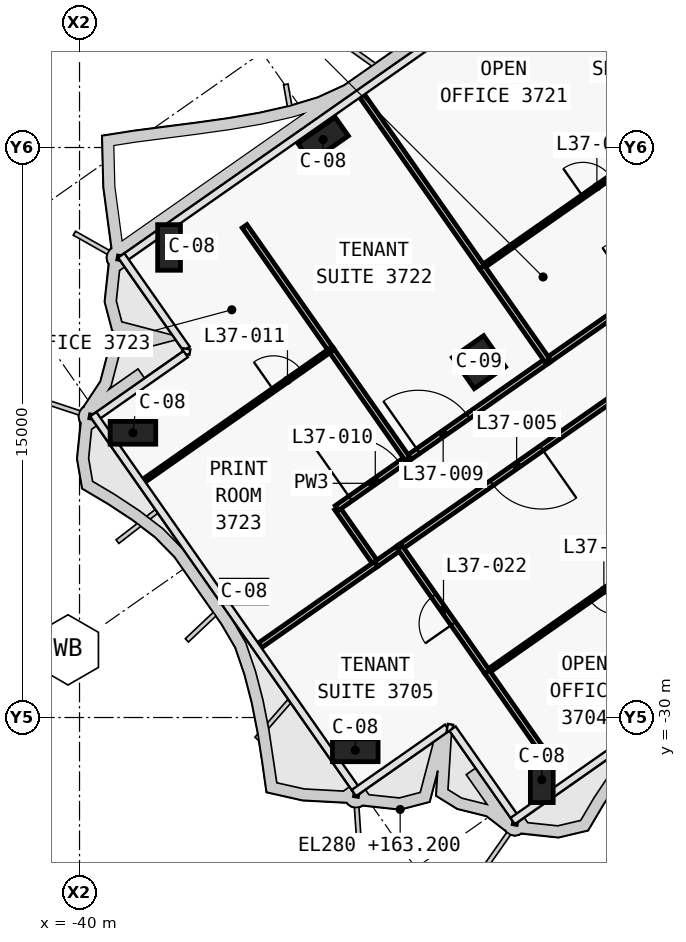
"""IFC4 building model, lengths in metres.
Left out: names, types, materials, properties, quantities, classifications, styles, units other than length and angle.
Written with IfcOpenShell. Run it as: python <this file> out.ifc"""

import sys

from ifc_helpers import new_model, si_unit, direction, frame, frame_2d, origin, origin_2d, place, context, subcontext, project, spatial, polyline, rectangle, outline, extrude, clip, halfspace, element, fill, save


model = new_model("IFC4")
c1 = context("Model", 3, precision=1e-05, world=origin(), true_north=direction((0.0, 1.0)))
c2 = subcontext(c1, "Body", "Model", "MODEL_VIEW")
j1 = project(units=[si_unit("LENGTHUNIT", "METRE"), si_unit("PLANEANGLEUNIT", "RADIAN")], contexts=[c1])
p1 = place(None, origin())
s1 = spatial("IfcSite", under=j1, at=p1, CompositionType="ELEMENT")
p2 = place(p1, origin())
s2 = spatial("IfcBuilding", under=s1, at=p2, CompositionType="ELEMENT")
p3 = place(p2, frame((0.0, 0.0, 163.2)))
s3 = spatial("IfcBuildingStorey", under=s2, at=p3, CompositionType="ELEMENT", Elevation=163.2)
p4 = place(p3, frame((-21.675, -15.421, 0.0), z_axis=(0.0, 0.0, 1.0), x_axis=(-0.573581815061, 0.819148278049, 0.0)))
e1 = element("IfcWall", 1, at=p4, inside=s3, PredefinedType="SHEAR", context=c2, shape_type="SweptSolid", body=[
    extrude(outline(polyline([(0.0, 0.4), (0.0, -0.4), (9.6, -0.4), (9.6, 0.4), (0.0, 0.4)])), origin(), (0.0, 0.0, 1.0), 3.9),
])
p5 = place(p4, frame((6.3, 0.0, 0.0)))
e2 = element("IfcOpeningElement", 2, at=p5, cuts=e1, PredefinedType="OPENING", context=c2, shape_type="SweptSolid", body=[
    extrude(rectangle(XDim=1.8, YDim=2.1, at=frame_2d((0.9, 1.05))), frame((0.0, 0.41, 0.0), z_axis=(0.0, -1.0, 0.0), x_axis=(1.0, 0.0, 0.0)), (0.0, 0.0, 1.0), 0.82),
])
p6 = place(p4, frame((2.1, 0.0, 0.0)))
e3 = element("IfcOpeningElement", 3, at=p6, cuts=e1, PredefinedType="OPENING", context=c2, shape_type="SweptSolid", body=[
    extrude(rectangle(XDim=1.8, YDim=2.1, at=frame_2d((0.9, 1.05))), frame((0.0, 0.41, 0.0), z_axis=(0.0, -1.0, 0.0), x_axis=(1.0, 0.0, 0.0)), (0.0, 0.0, 1.0), 0.82),
])
p7 = place(p3, frame((-28.042, -31.782, 0.0), z_axis=(0.477746603964, 0.334466003579, 0.812336552699), x_axis=(-0.665463644855, -0.465884977465, 0.583188927492)))
e4 = element("IfcColumn", 4, at=p7, inside=s3, PredefinedType="COLUMN", context=c2, shape_type="Clipping", body=[
    clip(clip(extrude(rectangle(XDim=1.2, YDim=0.6, at=origin_2d()), origin(), (0.0, 0.0, 1.0), 4.801), halfspace(frame((0.0, 0.0, 0.431), z_axis=(0.0, 0.0, 1.0), x_axis=(1.0, 0.0, 0.0)), True)), halfspace(frame((0.0, 0.0, 4.37), z_axis=(0.0, 0.0, 1.0), x_axis=(1.0, 0.0, 0.0)), False)),
])
p8 = place(p3, frame((-33.591, -14.792, 0.0), z_axis=(0.0, 0.0, 1.0), x_axis=(-0.819152044289, -0.573576436351, 0.0)))
e5 = element("IfcColumn", 5, at=p8, inside=s3, PredefinedType="COLUMN", context=c2, shape_type="SweptSolid", body=[
    extrude(rectangle(XDim=1.2, YDim=0.6, at=origin_2d()), origin(), (0.0, 0.0, 1.0), 3.9),
])
p9 = place(p3, frame((-37.85, -17.774, 0.0), z_axis=(0.477736700756, 0.334521041728, 0.812319713778), x_axis=(-0.665409295045, -0.465933243566, 0.583212382077)))
e6 = element("IfcColumn", 6, at=p9, inside=s3, PredefinedType="COLUMN", context=c2, shape_type="Clipping", body=[
    clip(clip(extrude(rectangle(XDim=1.2, YDim=0.6, at=origin_2d()), origin(), (0.0, 0.0, 1.0), 4.801), halfspace(frame((0.0, 0.0, 0.431), z_axis=(0.0, 0.0, 1.0), x_axis=(1.0, 0.0, 0.0)), True)), halfspace(frame((0.0, 0.0, 4.37), z_axis=(0.0, 0.0, 1.0), x_axis=(1.0, 0.0, 0.0)), False)),
])
p10 = place(p3, frame((-32.847, -30.935, 0.0), z_axis=(0.477704706914, 0.334521785172, 0.812338222809), x_axis=(-0.573610203854, 0.819128398991, 0.0)))
e7 = element("IfcColumn", 7, at=p10, inside=s3, PredefinedType="COLUMN", context=c2, shape_type="Clipping", body=[
    clip(clip(extrude(rectangle(XDim=1.2, YDim=0.6, at=origin_2d()), origin(), (0.0, 0.0, 1.0), 4.801), halfspace(frame((0.0, 0.0, 0.215), z_axis=(0.0, 0.0, 1.0), x_axis=(1.0, 0.0, 0.0)), True)), halfspace(frame((0.0, 0.0, 4.585), z_axis=(0.0, 0.0, 1.0), x_axis=(1.0, 0.0, 0.0)), False)),
])
p11 = place(p3, frame((-35.772, -26.757, 0.0), z_axis=(0.477738893719, 0.334562468952, 0.812301362671), x_axis=(-0.573629466203, 0.819114909829, 0.0)))
e8 = element("IfcColumn", 8, at=p11, inside=s3, PredefinedType="COLUMN", context=c2, shape_type="Clipping", body=[
    clip(clip(extrude(rectangle(XDim=1.2, YDim=0.6, at=origin_2d()), origin(), (0.0, 0.0, 1.0), 4.801), halfspace(frame((0.0, 0.0, 0.215), z_axis=(0.0, 0.0, 1.0), x_axis=(1.0, 0.0, 0.0)), True)), halfspace(frame((0.0, 0.0, 4.586), z_axis=(0.0, 0.0, 1.0), x_axis=(1.0, 0.0, 0.0)), False)),
])
p12 = place(p3, frame((-38.698, -22.579, 0.0), z_axis=(0.477747821975, 0.334512857575, 0.812316543421), x_axis=(-0.573565197047, 0.819159914019, 0.0)))
e9 = element("IfcColumn", 9, at=p12, inside=s3, PredefinedType="COLUMN", context=c2, shape_type="Clipping", body=[
    clip(clip(extrude(rectangle(XDim=1.2, YDim=0.6, at=origin_2d()), origin(), (0.0, 0.0, 1.0), 4.801), halfspace(frame((0.0, 0.0, 0.215), z_axis=(0.0, 0.0, 1.0), x_axis=(1.0, 0.0, 0.0)), True)), halfspace(frame((0.0, 0.0, 4.586), z_axis=(0.0, 0.0, 1.0), x_axis=(1.0, 0.0, 0.0)), False)),
])
p13 = place(p3, frame((-29.49, -20.649, 0.0), z_axis=(0.0, 0.0, 1.0), x_axis=(-0.819152044289, -0.573576436351, 0.0)))
e10 = element("IfcColumn", 10, at=p13, inside=s3, PredefinedType="COLUMN", context=c2, shape_type="SweptSolid", body=[
    extrude(rectangle(XDim=1.0, YDim=1.0, at=origin_2d()), origin(), (0.0, 0.0, 1.0), 3.9),
])
p14 = place(p3, frame((-27.689, -20.609, 0.0), z_axis=(0.0, 0.0, 1.0), x_axis=(0.819148008851, 0.573582199511, 0.0)))
e11 = element("IfcWall", 11, at=p14, inside=s3, PredefinedType="PARTITIONING", context=c2, shape_type="SweptSolid", body=[
    extrude(rectangle(XDim=7.382, YDim=0.15, at=frame_2d((3.691, 0.0))), origin(), (0.0, 0.0, 1.0), 3.0),
])
p15 = place(p14, frame((2.891, 0.0, 0.0)))
e12 = element("IfcOpeningElement", 12, at=p15, cuts=e11, PredefinedType="OPENING", context=c2, shape_type="SweptSolid", body=[
    extrude(rectangle(XDim=1.6, YDim=2.1, at=frame_2d((0.8, 1.05))), frame((0.0, 0.085, 0.0), z_axis=(0.0, -1.0, 0.0), x_axis=(1.0, 0.0, 0.0)), (0.0, 0.0, 1.0), 0.17),
])
p16 = place(p3, frame((-31.375, -23.19, 0.0), z_axis=(0.0, 0.0, 1.0), x_axis=(0.819165703328, 0.573556928727, 0.0)))
e13 = element("IfcWall", 13, at=p16, inside=s3, PredefinedType="PARTITIONING", context=c2, shape_type="SweptSolid", body=[
    extrude(rectangle(XDim=4.504, YDim=0.15, at=frame_2d((2.252, 0.0))), origin(), (0.0, 0.0, 1.0), 3.0),
])
p17 = place(p16, frame((0.352, 0.0, 0.0)))
e14 = element("IfcOpeningElement", 14, at=p17, cuts=e13, PredefinedType="OPENING", context=c2, shape_type="SweptSolid", body=[
    extrude(rectangle(XDim=1.6, YDim=2.1, at=frame_2d((0.8, 1.05))), frame((0.0, 0.085, 0.0), z_axis=(0.0, -1.0, 0.0), x_axis=(1.0, 0.0, 0.0)), (0.0, 0.0, 1.0), 0.17),
])
p18 = place(p3, frame((-32.194, -25.961, 0.0), z_axis=(0.0, 0.0, 1.0), x_axis=(-0.573553363558, 0.819168199548, 0.0)))
e15 = element("IfcWall", 15, at=p18, inside=s3, PredefinedType="PARTITIONING", context=c2, shape_type="SweptSolid", body=[
    extrude(rectangle(XDim=1.8, YDim=0.15, at=frame_2d((0.9, 0.0))), origin(), (0.0, 0.0, 1.0), 3.0),
])
p19 = place(p3, frame((-33.226, -24.486, 0.0), z_axis=(0.0, 0.0, 1.0), x_axis=(0.819176192989, 0.573541946888, 0.0)))
e16 = element("IfcWall", 16, at=p19, inside=s3, PredefinedType="PARTITIONING", context=c2, shape_type="SweptSolid", body=[
    extrude(rectangle(XDim=2.264, YDim=0.15, at=frame_2d((1.132, 0.0))), origin(), (0.0, 0.0, 1.0), 3.0),
])
p20 = place(p19, frame((0.432, 0.0, 0.0)))
e17 = element("IfcOpeningElement", 17, at=p20, cuts=e16, PredefinedType="OPENING", context=c2, shape_type="SweptSolid", body=[
    extrude(rectangle(XDim=1.6, YDim=2.1, at=frame_2d((0.8, 1.05))), frame((0.0, 0.085, 0.0), z_axis=(0.0, -1.0, 0.0), x_axis=(1.0, 0.0, 0.0)), (0.0, 0.0, 1.0), 0.17),
])
p21 = place(p3, frame((-25.424, -21.22, 0.0), z_axis=(0.0, 0.0, 1.0), x_axis=(-0.819149375276, -0.573580248078, 0.0)))
e18 = element("IfcWall", 18, at=p21, inside=s3, PredefinedType="PARTITIONING", context=c2, shape_type="SweptSolid", body=[
    extrude(rectangle(XDim=7.504, YDim=0.15, at=frame_2d((3.752, 0.0))), origin(), (0.0, 0.0, 1.0), 3.0),
])
p22 = place(p21, frame((2.952, 0.0, 0.0)))
e19 = element("IfcOpeningElement", 19, at=p22, cuts=e18, PredefinedType="OPENING", context=c2, shape_type="SweptSolid", body=[
    extrude(rectangle(XDim=1.6, YDim=2.1, at=frame_2d((0.8, 1.05))), frame((0.0, 0.085, 0.0), z_axis=(0.0, -1.0, 0.0), x_axis=(1.0, 0.0, 0.0)), (0.0, 0.0, 1.0), 0.17),
])
p23 = place(p3, frame((-31.568, -25.522, 0.0), z_axis=(0.0, 0.0, 1.0), x_axis=(-0.818946604201, -0.573869723428, 0.0)))
e20 = element("IfcWall", 20, at=p23, inside=s3, PredefinedType="PARTITIONING", context=c2, shape_type="SweptSolid", body=[
    extrude(rectangle(XDim=0.764, YDim=0.15, at=frame_2d((0.382, 0.0))), origin(), (0.0, 0.0, 1.0), 3.62),
])
p24 = place(p3, frame((-29.408, -18.149, 0.0), z_axis=(0.0, 0.0, 1.0), x_axis=(0.819144879919, 0.573586667996, 0.0)))
e21 = element("IfcWall", 21, at=p24, inside=s3, PredefinedType="PARTITIONING", context=c2, shape_type="SweptSolid", body=[
    extrude(rectangle(XDim=7.38, YDim=0.1, at=frame_2d((3.69, 0.0))), origin(), (0.0, 0.0, 1.0), 3.62),
])
p25 = place(p24, frame((3.24, 0.0, 0.0)))
e22 = element("IfcOpeningElement", 22, at=p25, cuts=e21, PredefinedType="OPENING", context=c2, shape_type="SweptSolid", body=[
    extrude(rectangle(XDim=0.9, YDim=2.1, at=frame_2d((0.45, 1.05))), frame((0.0, 0.06, 0.0), z_axis=(0.0, -1.0, 0.0), x_axis=(1.0, 0.0, 0.0)), (0.0, 0.0, 1.0), 0.12),
])
p26 = place(p3, frame((-29.408, -18.149, 0.0), z_axis=(0.0, 0.0, 1.0), x_axis=(-0.573560668443, 0.819163084871, 0.0)))
e23 = element("IfcWall", 23, at=p26, inside=s3, PredefinedType="PARTITIONING", context=c2, shape_type="SweptSolid", body=[
    extrude(rectangle(XDim=5.499, YDim=0.15, at=frame_2d((2.75, 0.0))), origin(), (0.0, 0.0, 1.0), 3.0),
])
p27 = place(p3, frame((-27.687, -20.607, 0.0), z_axis=(0.0, 0.0, 1.0), x_axis=(-0.573598887793, 0.819136323161, 0.0)))
e24 = element("IfcWall", 24, at=p27, inside=s3, PredefinedType="PARTITIONING", context=c2, shape_type="SweptSolid", body=[
    extrude(rectangle(XDim=3.0, YDim=0.15, at=frame_2d((1.5, 0.0))), origin(), (0.0, 0.0, 1.0), 3.0),
])
p28 = place(p3, frame((-33.38, -20.323, 0.0), z_axis=(0.0, 0.0, 1.0), x_axis=(-0.573569716318, 0.819156749665, 0.0)))
e25 = element("IfcWall", 25, at=p28, inside=s3, PredefinedType="PARTITIONING", context=c2, shape_type="SweptSolid", body=[
    extrude(rectangle(XDim=3.968, YDim=0.15, at=frame_2d((1.984, 0.0))), origin(), (0.0, 0.0, 1.0), 3.62),
])
p29 = place(p3, frame((-31.373, -23.189, 0.0), z_axis=(0.0, 0.0, 1.0), x_axis=(-0.573602698703, 0.819133654565, 0.0)))
e26 = element("IfcWall", 26, at=p29, inside=s3, PredefinedType="PARTITIONING", context=c2, shape_type="SweptSolid", body=[
    extrude(rectangle(XDim=3.502, YDim=0.15, at=frame_2d((1.751, 0.0))), origin(), (0.0, 0.0, 1.0), 3.0),
])
p30 = place(p3, frame((-38.296, -23.762, 0.0), z_axis=(0.0, 0.0, 1.0), x_axis=(0.819163097304, 0.573560650686, 0.0)))
e27 = element("IfcWall", 27, at=p30, inside=s3, PredefinedType="PARTITIONING", context=c2, shape_type="SweptSolid", body=[
    extrude(rectangle(XDim=6.0, YDim=0.1, at=frame_2d((3.0, 0.0))), origin(), (0.0, 0.0, 1.0), 2.9),
])
p31 = place(p30, frame((4.15, 0.0, 0.0)))
e28 = element("IfcOpeningElement", 28, at=p31, cuts=e27, PredefinedType="OPENING", context=c2, shape_type="SweptSolid", body=[
    extrude(rectangle(XDim=0.9, YDim=2.1, at=frame_2d((0.45, 1.05))), frame((0.0, 0.06, 0.0), z_axis=(0.0, -1.0, 0.0), x_axis=(1.0, 0.0, 0.0)), (0.0, 0.0, 1.0), 0.12),
])
p32 = place(p3, frame((-32.194, -25.961, 0.0), z_axis=(0.0, 0.0, 1.0), x_axis=(-0.819139845177, -0.573593858094, 0.0)))
e29 = element("IfcWall", 29, at=p32, inside=s3, PredefinedType="PARTITIONING", context=c2, shape_type="SweptSolid", body=[
    extrude(rectangle(XDim=3.738, YDim=0.15, at=frame_2d((1.869, 0.0))), origin(), (0.0, 0.0, 1.0), 2.9),
])
p33 = place(p3, frame((-23.131, -24.499, 0.0), z_axis=(0.0, 0.0, 1.0), x_axis=(-0.819163097304, -0.573560650686, 0.0)))
e30 = element("IfcWall", 30, at=p33, inside=s3, PredefinedType="PARTITIONING", context=c2, shape_type="SweptSolid", body=[
    extrude(rectangle(XDim=7.5, YDim=0.1, at=frame_2d((3.75, 0.0))), origin(), (0.0, 0.0, 1.0), 3.0),
])
p34 = place(p33, frame((3.3, 0.0, 0.0)))
e31 = element("IfcOpeningElement", 31, at=p34, cuts=e30, PredefinedType="OPENING", context=c2, shape_type="SweptSolid", body=[
    extrude(rectangle(XDim=0.9, YDim=2.1, at=frame_2d((0.45, 1.05))), frame((0.0, 0.06, 0.0), z_axis=(0.0, -1.0, 0.0), x_axis=(1.0, 0.0, 0.0)), (0.0, 0.0, 1.0), 0.12),
])
p35 = place(p3, frame((-27.861, -30.821, 0.0), z_axis=(0.0, 0.0, 1.0), x_axis=(-0.573588597125, 0.819143529089, 0.0)))
e32 = element("IfcWall", 32, at=p35, inside=s3, PredefinedType="PARTITIONING", context=c2, shape_type="SweptSolid", body=[
    extrude(rectangle(XDim=2.466, YDim=0.15, at=frame_2d((1.233, 0.0))), origin(), (0.0, 0.0, 1.0), 2.9),
])
p36 = place(p3, frame((-29.275, -28.8, 0.0), z_axis=(0.0, 0.0, 1.0), x_axis=(-0.573556557423, 0.819165963305, 0.0)))
e33 = element("IfcWall", 33, at=p36, inside=s3, PredefinedType="PARTITIONING", context=c2, shape_type="SweptSolid", body=[
    extrude(rectangle(XDim=4.0, YDim=0.15, at=frame_2d((2.0, 0.0))), origin(), (0.0, 0.0, 1.0), 3.62),
])
p37 = place(p36, frame((1.55, 0.0, 0.0)))
e34 = element("IfcOpeningElement", 34, at=p37, cuts=e33, PredefinedType="OPENING", context=c2, shape_type="SweptSolid", body=[
    extrude(rectangle(XDim=0.9, YDim=2.1, at=frame_2d((0.45, 1.05))), frame((0.0, 0.085, 0.0), z_axis=(0.0, -1.0, 0.0), x_axis=(1.0, 0.0, 0.0)), (0.0, 0.0, 1.0), 0.17),
])
p38 = place(p22, origin())
e35 = element("IfcDoor", 35, at=p38, inside=s3, OperationType="DOUBLE_DOOR_SINGLE_SWING", PredefinedType="DOOR", context=c2, shape_type="SweptSolid", body=[
    extrude(rectangle(XDim=1.6, YDim=2.1, at=frame_2d((0.8, 1.05))), frame((0.0, 0.025, 0.0), z_axis=(0.0, -1.0, 0.0), x_axis=(1.0, 0.0, 0.0)), (0.0, 0.0, 1.0), 0.05),
])
fill(e19, e35)
p39 = place(p34, origin())
e36 = element("IfcDoor", 36, at=p39, inside=s3, OperationType="SINGLE_SWING_RIGHT", PredefinedType="DOOR", context=c2, shape_type="SweptSolid", body=[
    extrude(rectangle(XDim=0.9, YDim=2.1, at=frame_2d((0.45, 1.05))), frame((0.0, 0.025, 0.0), z_axis=(0.0, -1.0, 0.0), x_axis=(1.0, 0.0, 0.0)), (0.0, 0.0, 1.0), 0.05),
])
fill(e31, e36)
p40 = place(p25, origin())
e37 = element("IfcDoor", 37, at=p40, inside=s3, OperationType="SINGLE_SWING_LEFT", PredefinedType="DOOR", context=c2, shape_type="SweptSolid", body=[
    extrude(rectangle(XDim=0.9, YDim=2.1, at=frame_2d((0.45, 1.05))), frame((0.0, 0.025, 0.0), z_axis=(0.0, -1.0, 0.0), x_axis=(1.0, 0.0, 0.0)), (0.0, 0.0, 1.0), 0.05),
])
fill(e22, e37)
p41 = place(p17, origin())
e38 = element("IfcDoor", 38, at=p41, inside=s3, OperationType="DOUBLE_DOOR_SINGLE_SWING", PredefinedType="DOOR", context=c2, shape_type="SweptSolid", body=[
    extrude(rectangle(XDim=1.6, YDim=2.1, at=frame_2d((0.8, 1.05))), frame((0.0, 0.025, 0.0), z_axis=(0.0, -1.0, 0.0), x_axis=(1.0, 0.0, 0.0)), (0.0, 0.0, 1.0), 0.05),
])
fill(e14, e38)
p42 = place(p20, origin())
e39 = element("IfcDoor", 39, at=p42, inside=s3, OperationType="DOUBLE_DOOR_SINGLE_SWING", PredefinedType="DOOR", context=c2, shape_type="SweptSolid", body=[
    extrude(rectangle(XDim=1.6, YDim=2.1, at=frame_2d((0.8, 1.05))), frame((0.0, 0.025, 0.0), z_axis=(0.0, -1.0, 0.0), x_axis=(1.0, 0.0, 0.0)), (0.0, 0.0, 1.0), 0.05),
])
fill(e17, e39)
p43 = place(p31, origin())
e40 = element("IfcDoor", 40, at=p43, inside=s3, OperationType="SINGLE_SWING_LEFT", PredefinedType="DOOR", context=c2, shape_type="SweptSolid", body=[
    extrude(rectangle(XDim=0.9, YDim=2.1, at=frame_2d((0.45, 1.05))), frame((0.0, 0.025, 0.0), z_axis=(0.0, -1.0, 0.0), x_axis=(1.0, 0.0, 0.0)), (0.0, 0.0, 1.0), 0.05),
])
fill(e28, e40)
p44 = place(p37, origin())
e41 = element("IfcDoor", 41, at=p44, inside=s3, OperationType="SINGLE_SWING_RIGHT", PredefinedType="DOOR", context=c2, shape_type="SweptSolid", body=[
    extrude(rectangle(XDim=0.9, YDim=2.1, at=frame_2d((0.45, 1.05))), frame((0.0, 0.025, 0.0), z_axis=(0.0, -1.0, 0.0), x_axis=(1.0, 0.0, 0.0)), (0.0, 0.0, 1.0), 0.05),
])
fill(e34, e41)
save(model, sys.argv[1])
